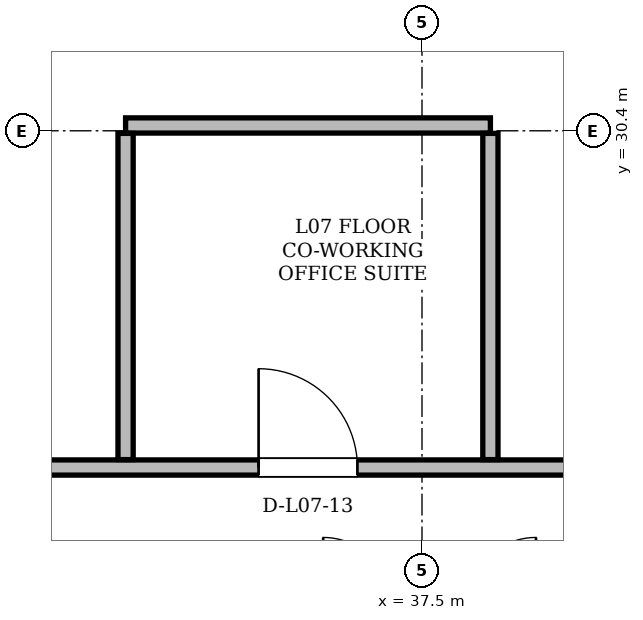
"""IFC4 building model, lengths in metres.
Left out: names, types, materials, properties, quantities, classifications, styles, units other than length and angle.
Written with IfcOpenShell. Run it as: python <this file> out.ifc"""

import sys

from ifc_helpers import new_model, si_unit, direction, frame, frame_2d, origin, place, context, subcontext, project, spatial, rectangle, extrude, element, fill, save


model = new_model("IFC4")
c1 = context("Model", 3, precision=1e-05, world=origin(), true_north=direction((0.0, 1.0)))
c2 = subcontext(c1, "Body", "Model", "MODEL_VIEW")
j1 = project(units=[si_unit("LENGTHUNIT", "METRE"), si_unit("PLANEANGLEUNIT", "RADIAN")], contexts=[c1])
p1 = place(None, origin())
s1 = spatial("IfcSite", under=j1, at=p1, CompositionType="ELEMENT")
p2 = place(p1, origin())
s2 = spatial("IfcBuilding", under=s1, at=p2, CompositionType="ELEMENT")
p3 = place(p2, frame((0.0, 0.0, 30.9)))
s3 = spatial("IfcBuildingStorey", under=s2, at=p3, CompositionType="ELEMENT", Elevation=30.9)
p4 = place(p3, frame((27.55, 25.97, 0.0), z_axis=(0.0, 0.0, 1.0), x_axis=(1.0, 0.0, 0.0)))
e1 = element("IfcWall", 1, at=p4, inside=s3, PredefinedType="PARTITIONING", context=c2, shape_type="SweptSolid", body=[
    extrude(rectangle(XDim=19.9, YDim=0.2, at=frame_2d((9.95, 0.0))), origin(), (0.0, 0.0, 1.0), 2.738),
])
p5 = place(p4, frame((2.619, 0.0, 0.0)))
e2 = element("IfcOpeningElement", 2, at=p5, cuts=e1, PredefinedType="OPENING", context=c2, shape_type="SweptSolid", body=[
    extrude(rectangle(XDim=1.0, YDim=2.18, at=frame_2d((0.5, 1.09))), frame((0.0, 0.1, 0.0), z_axis=(0.0, -1.0, 0.0), x_axis=(1.0, 0.0, 0.0)), (0.0, 0.0, 1.0), 0.2),
])
p6 = place(p4, frame((7.8, 0.0, 0.0)))
e3 = element("IfcOpeningElement", 3, at=p6, cuts=e1, PredefinedType="OPENING", context=c2, shape_type="SweptSolid", body=[
    extrude(rectangle(XDim=1.3, YDim=2.2, at=frame_2d((0.65, 1.1))), frame((0.0, 0.1, 0.0), z_axis=(0.0, -1.0, 0.0), x_axis=(1.0, 0.0, 0.0)), (0.0, 0.0, 1.0), 0.2),
])
p7 = place(p4, frame((16.862, 0.0, 0.0)))
e4 = element("IfcOpeningElement", 4, at=p7, cuts=e1, PredefinedType="OPENING", context=c2, shape_type="SweptSolid", body=[
    extrude(rectangle(XDim=1.0, YDim=2.18, at=frame_2d((0.5, 1.09))), frame((0.0, 0.1, 0.0), z_axis=(0.0, -1.0, 0.0), x_axis=(1.0, 0.0, 0.0)), (0.0, 0.0, 1.0), 0.2),
])
p8 = place(p3, frame((33.6, 30.47, 0.0), z_axis=(0.0, 0.0, 1.0), x_axis=(1.0, 0.0, 0.0)))
e5 = element("IfcWall", 5, at=p8, inside=s3, PredefinedType="PARTITIONING", context=c2, shape_type="SweptSolid", body=[
    extrude(rectangle(XDim=4.8, YDim=0.2, at=frame_2d((2.4, 0.0))), origin(), (0.0, 0.0, 1.0), 3.36),
])
for number, where, z_axis, x_axis in (
    (6, (33.6, 26.074, 0.0), (0.0, 0.0, 1.0), (0.0, 1.0, 0.0)),
    (7, (38.4, 26.074, 0.0), (0.0, 0.0, 1.0), (0.0, 1.0, 0.0)),
):
    element("IfcWall", number, at=place(p3, frame(where, z_axis=z_axis, x_axis=x_axis)), inside=s3, PredefinedType="PARTITIONING", context=c2, shape_type="SweptSolid", body=[
        extrude(rectangle(XDim=4.292, YDim=0.2, at=frame_2d((2.146, 0.0))), origin(), (0.0, 0.0, 1.0), 3.36),
    ])
p9 = place(p6, origin())
e8 = element("IfcDoor", 8, at=p9, inside=s3, OperationType="SINGLE_SWING_LEFT", PredefinedType="DOOR", context=c2, shape_type="SweptSolid", body=[
    extrude(rectangle(XDim=1.3, YDim=2.2, at=frame_2d((0.65, 1.1))), frame((0.0, 0.025, 0.0), z_axis=(0.0, -1.0, 0.0), x_axis=(1.0, 0.0, 0.0)), (0.0, 0.0, 1.0), 0.05),
])
fill(e3, e8)
save(model, sys.argv[1])
